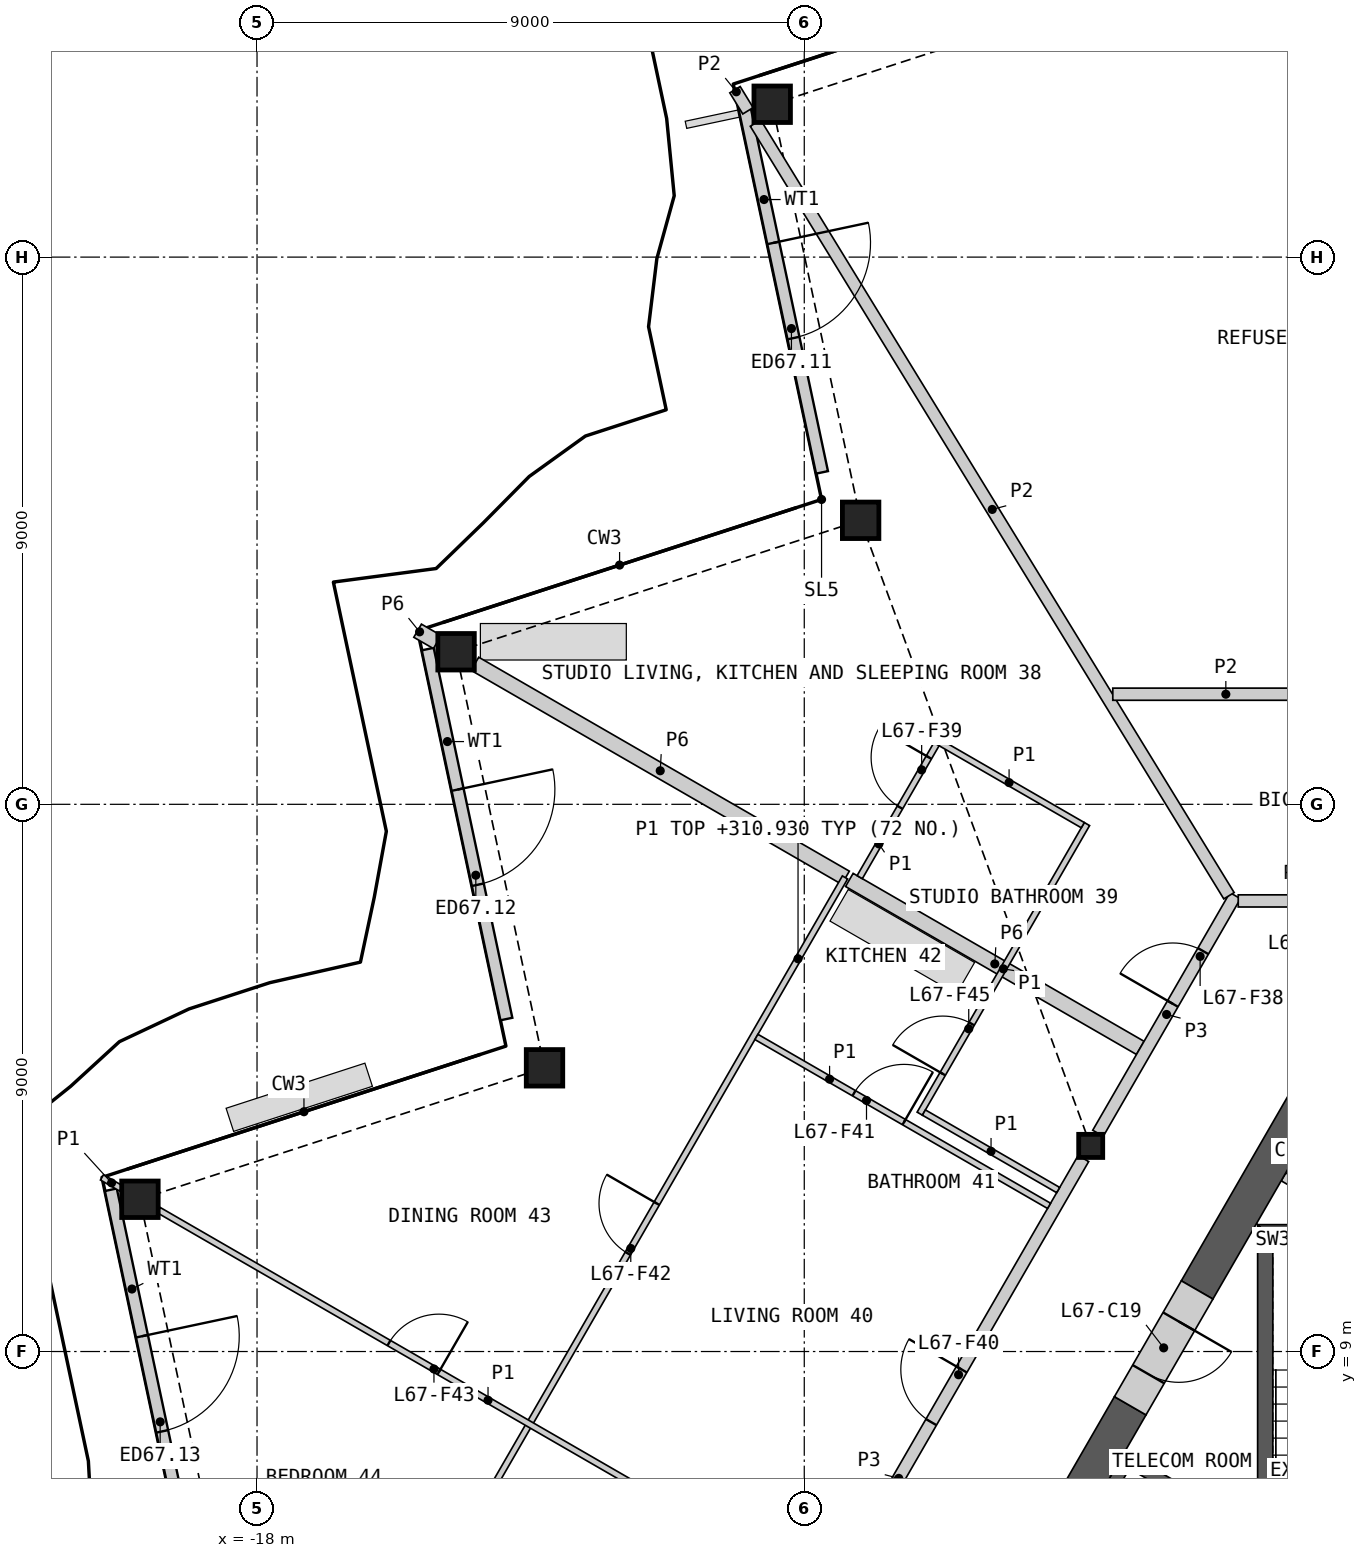
"""IFC4 building model, lengths in metres.
Left out: names, types, materials, properties, quantities, classifications, styles, units other than length and angle.
Written with IfcOpenShell. Run it as: python <this file> out.ifc"""

import sys

from ifc_helpers import new_model, si_unit, direction, frame, frame_2d, origin, origin_2d, place, context, subcontext, project, spatial, polyline, rectangle, hollow_rectangle, i_section, outline, extrude, element, fill, save


model = new_model("IFC4")
c1 = context("Model", 3, precision=1e-05, world=origin(), true_north=direction((0.0, 1.0)))
c2 = subcontext(c1, "Body", "Model", "MODEL_VIEW")
j1 = project(units=[si_unit("LENGTHUNIT", "METRE"), si_unit("PLANEANGLEUNIT", "RADIAN")], contexts=[c1])
p1 = place(None, origin())
s1 = spatial("IfcSite", under=j1, at=p1, CompositionType="ELEMENT")
p2 = place(p1, origin())
s2 = spatial("IfcBuilding", under=s1, at=p2, CompositionType="ELEMENT")
p3 = place(p2, frame((0.0, 0.0, 308.6)))
s3 = spatial("IfcBuildingStorey", under=s2, at=p3, CompositionType="ELEMENT", Elevation=308.6)
for number, where, z_axis, x_axis in (
    (1, (-9.527, 29.514, 0.0), (0.0, 0.0, 1.0), (1.0, 0.0, 0.0)),
    (2, (-8.073, 22.671, 0.0), (0.0, 0.0, 1.0), (1.0, 0.0, 0.0)),
    (3, (-14.727, 20.509, 0.0), (0.0, 0.0, 1.0), (1.0, 0.0, 0.0)),
    (4, (-13.272, 13.666, 0.0), (0.0, 0.0, 1.0), (1.0, 0.0, 0.0)),
    (5, (-19.926, 11.504, 0.0), (0.0, 0.0, 1.0), (1.0, 0.0, 0.0)),
):
    element("IfcColumn", number, at=place(p3, frame(where, z_axis=z_axis, x_axis=x_axis)), inside=s3, PredefinedType="COLUMN", context=c2, shape_type="SweptSolid", body=[
        extrude(hollow_rectangle(XDim=0.6, YDim=0.6, WallThickness=0.04, at=origin_2d()), origin(), (0.0, 0.0, 1.0), 3.4),
    ])
p4 = place(p3, frame((-4.289, 12.382, 0.0), z_axis=(0.0, 0.0, 1.0), x_axis=(1.0, 0.0, 0.0)))
e6 = element("IfcColumn", 6, at=p4, inside=s3, PredefinedType="COLUMN", context=c2, shape_type="SweptSolid", body=[
    extrude(i_section(OverallWidth=0.396, OverallDepth=0.381, WebThickness=0.019, FlangeThickness=0.03, at=origin_2d()), origin(), (0.0, 0.0, 1.0), 3.4),
])
p5 = place(p3, frame((-9.98, 29.443, 0.0), z_axis=(0.0, 0.0, 1.0), x_axis=(0.20793703803, -0.978142212674, 0.0)))
e7 = element("IfcWall", 7, at=p5, inside=s3, PredefinedType="SOLIDWALL", context=c2, shape_type="SweptSolid", body=[
    extrude(rectangle(XDim=6.117, YDim=0.2, at=frame_2d((3.059, 0.0))), origin(), (0.0, 0.0, 1.0), 2.488),
])
p6 = place(p5, frame((2.259, 0.0, 0.0)))
e8 = element("IfcOpeningElement", 8, at=p6, cuts=e7, PredefinedType="OPENING", context=c2, shape_type="SweptSolid", body=[
    extrude(rectangle(XDim=1.6, YDim=2.25, at=frame_2d((0.8, 1.125))), frame((0.0, 0.11, 0.0), z_axis=(0.0, -1.0, 0.0), x_axis=(1.0, 0.0, 0.0)), (0.0, 0.0, 1.0), 0.22),
])
p7 = place(p3, frame((-15.192, 20.553, 0.0), z_axis=(0.0, 0.0, 1.0), x_axis=(0.207920712138, -0.97814568315, 0.0)))
e9 = element("IfcWall", 9, at=p7, inside=s3, PredefinedType="SOLIDWALL", context=c2, shape_type="SweptSolid", body=[
    extrude(rectangle(XDim=6.221, YDim=0.2, at=frame_2d((3.11, 0.0))), origin(), (0.0, 0.0, 1.0), 2.488),
])
p8 = place(p7, frame((2.362, 0.0, 0.0)))
e10 = element("IfcOpeningElement", 10, at=p8, cuts=e9, PredefinedType="OPENING", context=c2, shape_type="SweptSolid", body=[
    extrude(rectangle(XDim=1.6, YDim=2.25, at=frame_2d((0.8, 1.125))), frame((0.0, 0.11, 0.0), z_axis=(0.0, -1.0, 0.0), x_axis=(1.0, 0.0, 0.0)), (0.0, 0.0, 1.0), 0.22),
])
p9 = place(p3, frame((-20.404, 11.661, 0.0), z_axis=(0.0, 0.0, 1.0), x_axis=(0.207893301034, -0.978151509422, 0.0)))
e11 = element("IfcWall", 11, at=p9, inside=s3, PredefinedType="SOLIDWALL", context=c2, shape_type="SweptSolid", body=[
    extrude(rectangle(XDim=6.677, YDim=0.2, at=frame_2d((3.339, 0.0))), origin(), (0.0, 0.0, 1.0), 2.488),
])
p10 = place(p9, frame((2.463, 0.0, 0.0)))
e12 = element("IfcOpeningElement", 12, at=p10, cuts=e11, PredefinedType="OPENING", context=c2, shape_type="SweptSolid", body=[
    extrude(rectangle(XDim=1.6, YDim=2.25, at=frame_2d((0.8, 1.125))), frame((0.0, 0.11, 0.0), z_axis=(0.0, -1.0, 0.0), x_axis=(1.0, 0.0, 0.0)), (0.0, 0.0, 1.0), 0.22),
])
p11 = place(p3, origin())
e13 = element("IfcWall", 13, at=p11, inside=s3, PredefinedType="SHEAR", context=c2, shape_type="SweptSolid", body=[
    extrude(outline(polyline([(-4.96, 0.208), (-7.131, 1.461), (-3.731, 7.35), (-1.561, 6.097), (-1.66, 5.924), (-3.652, 7.074), (-4.652, 5.342), (-2.66, 4.192), (-2.76, 4.019), (-4.752, 5.169), (-6.852, 1.531), (-4.861, 0.381), (-4.96, 0.208)])), origin(), (0.0, 0.0, 1.0), 3.1),
])
p12 = place(p3, origin())
e14 = element("IfcWall", 14, at=p12, inside=s3, PredefinedType="SHEAR", context=c2, shape_type="SweptSolid", body=[
    extrude(outline(polyline([(1.544, 11.087), (-1.544, 11.087), (-1.294, 10.837), (1.294, 10.837), (1.544, 11.087)])), origin(), (0.0, 0.0, 1.0), 3.1),
])
p13 = place(p3, origin())
e15 = element("IfcWall", 15, at=p13, inside=s3, PredefinedType="SHEAR", context=c2, shape_type="SweptSolid", body=[
    extrude(outline(polyline([(-1.294, 10.837), (-1.544, 11.087), (-1.544, 5.237), (-1.294, 5.237), (-1.294, 10.837)])), origin(), (0.0, 0.0, 1.0), 3.1),
])
p14 = place(p3, frame((-1.119, 11.873, 0.0), z_axis=(0.0, 0.0, 1.0), x_axis=(0.865992812752, -0.500056445075, 0.0)))
e16 = element("IfcWall", 16, at=p14, inside=s3, PredefinedType="PARTITIONING", context=c2, shape_type="SweptSolid", body=[
    extrude(rectangle(XDim=1.582, YDim=0.15, at=frame_2d((0.791, 0.0))), origin(), (0.0, 0.0, 1.0), 3.1),
])
p15 = place(p3, frame((-3.639, 8.107, 0.0), z_axis=(0.0, 0.0, 1.0), x_axis=(-0.49999180351, -0.866030135978, 0.0)))
e17 = element("IfcWall", 17, at=p15, inside=s3, PredefinedType="SHEAR", context=c2, shape_type="SweptSolid", body=[
    extrude(rectangle(XDim=7.401, YDim=0.6, at=frame_2d((3.701, 0.0))), origin(), (0.0, 0.0, 1.0), 3.1),
])
p16 = place(p3, frame((-0.26, 13.961, 0.0), z_axis=(0.0, 0.0, 1.0), x_axis=(-0.499980485389, -0.866036670257, 0.0)))
e18 = element("IfcWall", 18, at=p16, inside=s3, PredefinedType="SHEAR", context=c2, shape_type="SweptSolid", body=[
    extrude(rectangle(XDim=4.559, YDim=0.6, at=frame_2d((2.28, 0.0))), origin(), (0.0, 0.0, 1.0), 3.1),
])
p17 = place(p3, frame((-2.539, 10.013, 0.0), z_axis=(0.0, 0.0, 1.0), x_axis=(-0.50002983664, -0.866008176907, 0.0)))
e19 = element("IfcWall", 19, at=p17, inside=s3, PredefinedType="SHEAR", context=c2, shape_type="SweptSolid", body=[
    extrude(rectangle(XDim=2.2, YDim=0.6, at=frame_2d((1.1, 0.0))), origin(), (0.0, 0.0, 1.0), 3.1),
])
p18 = place(p17, frame((0.6, 0.0, 0.0)))
e20 = element("IfcOpeningElement", 20, at=p18, cuts=e19, PredefinedType="OPENING", context=c2, shape_type="SweptSolid", body=[
    extrude(rectangle(XDim=1.0, YDim=2.1, at=frame_2d((0.5, 1.05))), frame((0.0, 0.31, 0.0), z_axis=(0.0, -1.0, 0.0), x_axis=(1.0, 0.0, 0.0)), (0.0, 0.0, 1.0), 0.62),
])
p19 = place(p3, frame((-8.458, 5.16, 0.0), z_axis=(0.0, 0.0, 1.0), x_axis=(0.499984266882, 0.866034487114, 0.0)))
e21 = element("IfcWall", 21, at=p19, inside=s3, PredefinedType="PARTITIONING", context=c2, shape_type="SweptSolid", body=[
    extrude(rectangle(XDim=8.099, YDim=0.2, at=frame_2d((4.049, 0.0))), origin(), (0.0, 0.0, 1.0), 3.1),
])
p20 = place(p19, frame((3.093, 0.0, 0.0)))
e22 = element("IfcOpeningElement", 22, at=p20, cuts=e21, PredefinedType="OPENING", context=c2, shape_type="SweptSolid", body=[
    extrude(rectangle(XDim=1.0, YDim=2.1, at=frame_2d((0.5, 1.05))), frame((0.0, 0.11, 0.0), z_axis=(0.0, -1.0, 0.0), x_axis=(1.0, 0.0, 0.0)), (0.0, 0.0, 1.0), 0.22),
])
p21 = place(p3, frame((-14.417, 20.311, 0.0), z_axis=(0.0, 0.0, 1.0), x_axis=(0.866027308682, -0.499996700606, 0.0)))
e23 = element("IfcWall", 23, at=p21, inside=s3, PredefinedType="PARTITIONING", context=c2, shape_type="SweptSolid", body=[
    extrude(rectangle(XDim=7.038, YDim=0.25, at=frame_2d((3.519, 0.0))), origin(), (0.0, 0.0, 1.0), 2.33),
])
p22 = place(p3, frame((-8.259, 16.756, 0.0), z_axis=(0.0, 0.0, 1.0), x_axis=(0.866023692682, -0.500002963705, 0.0)))
e24 = element("IfcWall", 24, at=p22, inside=s3, PredefinedType="PARTITIONING", context=c2, shape_type="SweptSolid", body=[
    extrude(rectangle(XDim=5.525, YDim=0.25, at=frame_2d((2.762, 0.0))), origin(), (0.0, 0.0, 1.0), 2.33),
])
p23 = place(p3, frame((-4.169, 12.59, 0.0), z_axis=(0.0, 0.0, 1.0), x_axis=(0.499950370306, 0.866054055606, 0.0)))
e25 = element("IfcWall", 25, at=p23, inside=s3, PredefinedType="PARTITIONING", context=c2, shape_type="SweptSolid", body=[
    extrude(rectangle(XDim=4.513, YDim=0.2, at=frame_2d((2.256, 0.0))), origin(), (0.0, 0.0, 1.0), 3.1),
])
p24 = place(p23, frame((2.459, 0.0, 0.0)))
e26 = element("IfcOpeningElement", 26, at=p24, cuts=e25, PredefinedType="OPENING", context=c2, shape_type="SweptSolid", body=[
    extrude(rectangle(XDim=1.0, YDim=2.1, at=frame_2d((0.5, 1.05))), frame((0.0, 0.11, 0.0), z_axis=(0.0, -1.0, 0.0), x_axis=(1.0, 0.0, 0.0)), (0.0, 0.0, 1.0), 0.22),
])
p25 = place(p3, frame((-1.863, 16.411, 0.0), z_axis=(0.0, 0.0, 1.0), x_axis=(1.0, 0.0, 0.0)))
e27 = element("IfcWall", 27, at=p25, inside=s3, PredefinedType="PARTITIONING", context=c2, shape_type="SweptSolid", body=[
    extrude(rectangle(XDim=3.726, YDim=0.2, at=frame_2d((1.863, 0.0))), origin(), (0.0, 0.0, 1.0), 3.1),
])
p26 = place(p25, frame((1.388, 0.0, 0.0)))
e28 = element("IfcOpeningElement", 28, at=p26, cuts=e27, PredefinedType="OPENING", context=c2, shape_type="SweptSolid", body=[
    extrude(rectangle(XDim=0.95, YDim=2.1, at=frame_2d((0.475, 1.05))), frame((0.0, 0.11, 0.0), z_axis=(0.0, -1.0, 0.0), x_axis=(1.0, 0.0, 0.0)), (0.0, 0.0, 1.0), 0.22),
])
p27 = place(p3, frame((-15.359, 20.855, 0.0), z_axis=(0.0, 0.0, 1.0), x_axis=(0.865770353626, -0.500441499861, 0.0)))
e29 = element("IfcWall", 29, at=p27, inside=s3, PredefinedType="PARTITIONING", context=c2, shape_type="SweptSolid", body=[
    extrude(rectangle(XDim=0.372, YDim=0.25, at=frame_2d((0.186, 0.0))), origin(), (0.0, 0.0, 1.0), 2.33),
])
p28 = place(p3, frame((-9.802, 29.204, 0.0), z_axis=(0.0, 0.0, 1.0), x_axis=(0.522487920222, -0.852646687217, 0.0)))
e30 = element("IfcWall", 30, at=p28, inside=s3, PredefinedType="PARTITIONING", context=c2, shape_type="SweptSolid", body=[
    extrude(rectangle(XDim=14.904, YDim=0.2, at=frame_2d((7.452, 0.0))), origin(), (0.0, 0.0, 1.0), 2.33),
])
p29 = place(p3, frame((-3.926, 19.811, 0.0), z_axis=(0.0, 0.0, 1.0), x_axis=(1.0, 0.0, 0.0)))
e31 = element("IfcWall", 31, at=p29, inside=s3, PredefinedType="PARTITIONING", context=c2, shape_type="SweptSolid", body=[
    extrude(rectangle(XDim=3.718, YDim=0.2, at=frame_2d((1.859, 0.0))), origin(), (0.0, 0.0, 1.0), 2.33),
])
p30 = place(p3, frame((-10.139, 29.754, 0.0), z_axis=(0.0, 0.0, 1.0), x_axis=(0.522224976177, -0.852807759262, 0.0)))
e32 = element("IfcWall", 32, at=p30, inside=s3, PredefinedType="PARTITIONING", context=c2, shape_type="SweptSolid", body=[
    extrude(rectangle(XDim=0.408, YDim=0.2, at=frame_2d((0.204, 0.0))), origin(), (0.0, 0.0, 1.0), 2.33),
])
p31 = place(p3, frame((-16.054, 3.419, 0.0), z_axis=(0.0, 0.0, 1.0), x_axis=(0.499999256795, 0.866025832873, 0.0)))
e33 = element("IfcWall", 33, at=p31, inside=s3, PredefinedType="PARTITIONING", context=c2, shape_type="SweptSolid", body=[
    extrude(rectangle(XDim=15.448, YDim=0.1, at=frame_2d((7.724, 0.0))), origin(), (0.0, 0.0, 1.0), 2.33),
])
p32 = place(p31, frame((8.306, 0.0, 0.0)))
e34 = element("IfcOpeningElement", 34, at=p32, cuts=e33, PredefinedType="OPENING", context=c2, shape_type="SweptSolid", body=[
    extrude(rectangle(XDim=0.95, YDim=2.1, at=frame_2d((0.475, 1.05))), frame((0.0, 0.06, 0.0), z_axis=(0.0, -1.0, 0.0), x_axis=(1.0, 0.0, 0.0)), (0.0, 0.0, 1.0), 0.12),
])
p33 = place(p31, frame((1.76, 0.0, 0.0)))
e35 = element("IfcOpeningElement", 35, at=p33, cuts=e33, PredefinedType="OPENING", context=c2, shape_type="SweptSolid", body=[
    extrude(rectangle(XDim=0.95, YDim=2.1, at=frame_2d((0.475, 1.05))), frame((0.0, 0.06, 0.0), z_axis=(0.0, -1.0, 0.0), x_axis=(1.0, 0.0, 0.0)), (0.0, 0.0, 1.0), 0.12),
])
p34 = place(p3, frame((-19.615, 11.325, 0.0), z_axis=(0.0, 0.0, 1.0), x_axis=(0.86602139559, -0.500006942333, 0.0)))
e36 = element("IfcWall", 36, at=p34, inside=s3, PredefinedType="PARTITIONING", context=c2, shape_type="SweptSolid", body=[
    extrude(rectangle(XDim=12.505, YDim=0.1, at=frame_2d((6.252, 0.0))), origin(), (0.0, 0.0, 1.0), 2.33),
])
p35 = place(p34, frame((4.37, 0.0, 0.0)))
e37 = element("IfcOpeningElement", 37, at=p35, cuts=e36, PredefinedType="OPENING", context=c2, shape_type="SweptSolid", body=[
    extrude(rectangle(XDim=0.95, YDim=2.1, at=frame_2d((0.475, 1.05))), frame((0.0, 0.06, 0.0), z_axis=(0.0, -1.0, 0.0), x_axis=(1.0, 0.0, 0.0)), (0.0, 0.0, 1.0), 0.12),
])
p36 = place(p3, frame((-9.787, 14.174, 0.0), z_axis=(0.0, 0.0, 1.0), x_axis=(0.866031222068, -0.499989922303, 0.0)))
e38 = element("IfcWall", 38, at=p36, inside=s3, PredefinedType="PARTITIONING", context=c2, shape_type="SweptSolid", body=[
    extrude(rectangle(XDim=5.557, YDim=0.1, at=frame_2d((2.779, 0.0))), origin(), (0.0, 0.0, 1.0), 2.33),
])
p37 = place(p36, frame((1.853, 0.0, 0.0)))
e39 = element("IfcOpeningElement", 39, at=p37, cuts=e38, PredefinedType="OPENING", context=c2, shape_type="SweptSolid", body=[
    extrude(rectangle(XDim=0.95, YDim=2.1, at=frame_2d((0.475, 1.05))), frame((0.0, 0.06, 0.0), z_axis=(0.0, -1.0, 0.0), x_axis=(1.0, 0.0, 0.0)), (0.0, 0.0, 1.0), 0.12),
])
p38 = place(p3, frame((-7.101, 12.912, 0.0), z_axis=(0.0, 0.0, 1.0), x_axis=(0.499996545922, 0.866027397988, 0.0)))
e40 = element("IfcWall", 40, at=p38, inside=s3, PredefinedType="PARTITIONING", context=c2, shape_type="SweptSolid", body=[
    extrude(rectangle(XDim=5.5, YDim=0.1, at=frame_2d((2.75, 0.0))), origin(), (0.0, 0.0, 1.0), 2.33),
])
p39 = place(p38, frame((0.756, 0.0, 0.0)))
e41 = element("IfcOpeningElement", 41, at=p39, cuts=e40, PredefinedType="OPENING", context=c2, shape_type="SweptSolid", body=[
    extrude(rectangle(XDim=0.95, YDim=2.1, at=frame_2d((0.475, 1.05))), frame((0.0, 0.06, 0.0), z_axis=(0.0, -1.0, 0.0), x_axis=(1.0, 0.0, 0.0)), (0.0, 0.0, 1.0), 0.12),
])
p40 = place(p3, frame((-6.844, 19.057, 0.0), z_axis=(0.0, 0.0, 1.0), x_axis=(0.866034573852, -0.49998411664, 0.0)))
e42 = element("IfcWall", 42, at=p40, inside=s3, PredefinedType="PARTITIONING", context=c2, shape_type="SweptSolid", body=[
    extrude(rectangle(XDim=2.8, YDim=0.1, at=frame_2d((1.4, 0.0))), origin(), (0.0, 0.0, 1.0), 2.33),
])
p41 = place(p3, frame((-7.032, 12.93, 0.0), z_axis=(0.0, 0.0, 1.0), x_axis=(0.866030925526, -0.499990435942, 0.0)))
e43 = element("IfcWall", 43, at=p41, inside=s3, PredefinedType="PARTITIONING", context=c2, shape_type="SweptSolid", body=[
    extrude(rectangle(XDim=2.55, YDim=0.1, at=frame_2d((1.275, 0.0))), origin(), (0.0, 0.0, 1.0), 2.33),
])
p42 = place(p3, frame((-8.088, 16.802, 0.0), z_axis=(0.0, 0.0, 1.0), x_axis=(0.499976333282, 0.866039067339, 0.0)))
e44 = element("IfcWall", 44, at=p42, inside=s3, PredefinedType="PARTITIONING", context=c2, shape_type="SweptSolid", body=[
    extrude(rectangle(XDim=2.525, YDim=0.1, at=frame_2d((1.262, 0.0))), origin(), (0.0, 0.0, 1.0), 2.33),
])
p43 = place(p42, frame((1.325, 0.0, 0.0)))
e45 = element("IfcOpeningElement", 45, at=p43, cuts=e44, PredefinedType="OPENING", context=c2, shape_type="SweptSolid", body=[
    extrude(rectangle(XDim=0.95, YDim=2.1, at=frame_2d((0.475, 1.05))), frame((0.0, 0.06, 0.0), z_axis=(0.0, -1.0, 0.0), x_axis=(1.0, 0.0, 0.0)), (0.0, 0.0, 1.0), 0.12),
])
p44 = place(p3, frame((-20.55, 11.865, 0.0), z_axis=(0.0, 0.0, 1.0), x_axis=(0.866039913117, -0.499974868256, 0.0)))
e46 = element("IfcWall", 46, at=p44, inside=s3, PredefinedType="PARTITIONING", context=c2, shape_type="SweptSolid", body=[
    extrude(rectangle(XDim=0.363, YDim=0.1, at=frame_2d((0.181, 0.0))), origin(), (0.0, 0.0, 1.0), 2.33),
])
p45 = place(p6, origin())
e47 = element("IfcDoor", 47, at=p45, inside=s3, OperationType="DOUBLE_DOOR_SINGLE_SWING", PredefinedType="DOOR", context=c2, shape_type="SweptSolid", body=[
    extrude(rectangle(XDim=1.6, YDim=2.25, at=frame_2d((0.8, 1.125))), frame((0.0, 0.025, 0.0), z_axis=(0.0, -1.0, 0.0), x_axis=(1.0, 0.0, 0.0)), (0.0, 0.0, 1.0), 0.05),
])
fill(e8, e47)
p46 = place(p8, origin())
e48 = element("IfcDoor", 48, at=p46, inside=s3, OperationType="DOUBLE_DOOR_SINGLE_SWING", PredefinedType="DOOR", context=c2, shape_type="SweptSolid", body=[
    extrude(rectangle(XDim=1.6, YDim=2.25, at=frame_2d((0.8, 1.125))), frame((0.0, 0.025, 0.0), z_axis=(0.0, -1.0, 0.0), x_axis=(1.0, 0.0, 0.0)), (0.0, 0.0, 1.0), 0.05),
])
fill(e10, e48)
p47 = place(p10, origin())
e49 = element("IfcDoor", 49, at=p47, inside=s3, OperationType="DOUBLE_DOOR_SINGLE_SWING", PredefinedType="DOOR", context=c2, shape_type="SweptSolid", body=[
    extrude(rectangle(XDim=1.6, YDim=2.25, at=frame_2d((0.8, 1.125))), frame((0.0, 0.025, 0.0), z_axis=(0.0, -1.0, 0.0), x_axis=(1.0, 0.0, 0.0)), (0.0, 0.0, 1.0), 0.05),
])
fill(e12, e49)
p48 = place(p18, origin())
e50 = element("IfcDoor", 50, at=p48, inside=s3, OperationType="SINGLE_SWING_LEFT", PredefinedType="DOOR", context=c2, shape_type="SweptSolid", body=[
    extrude(rectangle(XDim=1.0, YDim=2.1, at=frame_2d((0.5, 1.05))), frame((0.0, 0.055, 0.0), z_axis=(0.0, -1.0, 0.0), x_axis=(1.0, 0.0, 0.0)), (0.0, 0.0, 1.0), 0.05),
])
fill(e20, e50)
p49 = place(p24, origin())
e51 = element("IfcDoor", 51, at=p49, inside=s3, OperationType="SINGLE_SWING_LEFT", PredefinedType="DOOR", context=c2, shape_type="SweptSolid", body=[
    extrude(rectangle(XDim=1.0, YDim=2.1, at=frame_2d((0.5, 1.05))), frame((0.0, 0.025, 0.0), z_axis=(0.0, -1.0, 0.0), x_axis=(1.0, 0.0, 0.0)), (0.0, 0.0, 1.0), 0.05),
])
fill(e26, e51)
p50 = place(p43, origin())
e52 = element("IfcDoor", 52, at=p50, inside=s3, OperationType="SINGLE_SWING_RIGHT", PredefinedType="DOOR", context=c2, shape_type="SweptSolid", body=[
    extrude(rectangle(XDim=0.95, YDim=2.1, at=frame_2d((0.475, 1.05))), frame((0.0, 0.025, 0.0), z_axis=(0.0, -1.0, 0.0), x_axis=(1.0, 0.0, 0.0)), (0.0, 0.0, 1.0), 0.05),
])
fill(e45, e52)
p51 = place(p20, origin())
e53 = element("IfcDoor", 53, at=p51, inside=s3, OperationType="SINGLE_SWING_RIGHT", PredefinedType="DOOR", context=c2, shape_type="SweptSolid", body=[
    extrude(rectangle(XDim=1.0, YDim=2.1, at=frame_2d((0.5, 1.05))), frame((0.0, 0.025, 0.0), z_axis=(0.0, -1.0, 0.0), x_axis=(1.0, 0.0, 0.0)), (0.0, 0.0, 1.0), 0.05),
])
fill(e22, e53)
p52 = place(p37, origin())
e54 = element("IfcDoor", 54, at=p52, inside=s3, OperationType="SINGLE_SWING_RIGHT", PredefinedType="DOOR", context=c2, shape_type="SweptSolid", body=[
    extrude(rectangle(XDim=0.95, YDim=2.1, at=frame_2d((0.475, 1.05))), frame((0.0, 0.025, 0.0), z_axis=(0.0, -1.0, 0.0), x_axis=(1.0, 0.0, 0.0)), (0.0, 0.0, 1.0), 0.05),
])
fill(e39, e54)
p53 = place(p32, origin())
e55 = element("IfcDoor", 55, at=p53, inside=s3, OperationType="SINGLE_SWING_RIGHT", PredefinedType="DOOR", context=c2, shape_type="SweptSolid", body=[
    extrude(rectangle(XDim=0.95, YDim=2.1, at=frame_2d((0.475, 1.05))), frame((0.0, 0.025, 0.0), z_axis=(0.0, -1.0, 0.0), x_axis=(1.0, 0.0, 0.0)), (0.0, 0.0, 1.0), 0.05),
])
fill(e34, e55)
p54 = place(p35, origin())
e56 = element("IfcDoor", 56, at=p54, inside=s3, OperationType="SINGLE_SWING_RIGHT", PredefinedType="DOOR", context=c2, shape_type="SweptSolid", body=[
    extrude(rectangle(XDim=0.95, YDim=2.1, at=frame_2d((0.475, 1.05))), frame((0.0, 0.025, 0.0), z_axis=(0.0, -1.0, 0.0), x_axis=(1.0, 0.0, 0.0)), (0.0, 0.0, 1.0), 0.05),
])
fill(e37, e56)
p55 = place(p39, origin())
e57 = element("IfcDoor", 57, at=p55, inside=s3, OperationType="SINGLE_SWING_LEFT", PredefinedType="DOOR", context=c2, shape_type="SweptSolid", body=[
    extrude(rectangle(XDim=0.95, YDim=2.1, at=frame_2d((0.475, 1.05))), frame((0.0, 0.025, 0.0), z_axis=(0.0, -1.0, 0.0), x_axis=(1.0, 0.0, 0.0)), (0.0, 0.0, 1.0), 0.05),
])
fill(e41, e57)
save(model, sys.argv[1])
